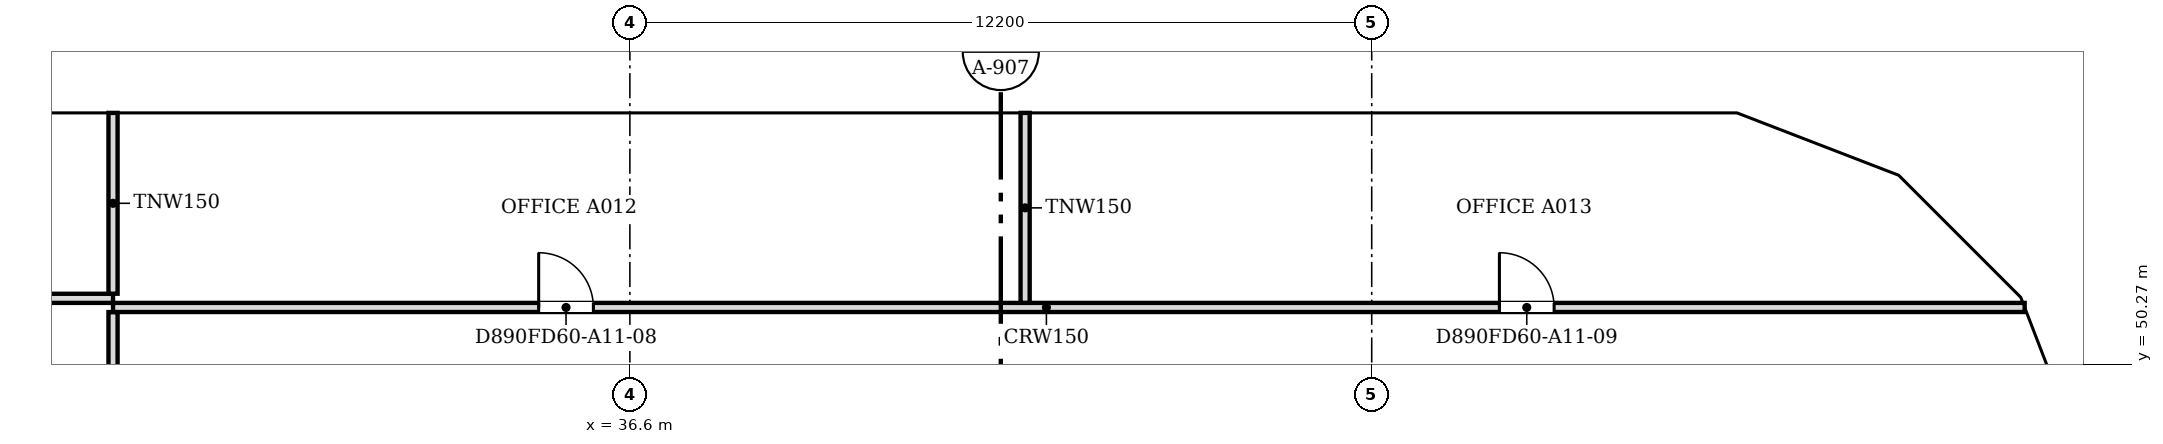
"""IFC4 building model, lengths in metres.
Left out: names, types, materials, properties, quantities, classifications, styles, units other than length and angle.
Written with IfcOpenShell. Run it as: python <this file> out.ifc"""

import sys

from ifc_helpers import new_model, si_unit, direction, frame, frame_2d, origin, place, context, subcontext, project, spatial, polyline, rectangle, outline, extrude, faceted_brep, source, transform, mapped, element, fill, save


model = new_model("IFC4")
c1 = context("Model", 3, precision=1e-05, world=origin(), true_north=direction((0.0, 1.0)))
c2 = subcontext(c1, "Body", "Model", "MODEL_VIEW")
j1 = project(units=[si_unit("LENGTHUNIT", "METRE"), si_unit("PLANEANGLEUNIT", "RADIAN")], contexts=[c1])
p1 = place(None, origin())
s1 = spatial("IfcSite", under=j1, at=p1, CompositionType="ELEMENT")
p2 = place(p1, origin())
s2 = spatial("IfcBuilding", under=s1, at=p2, CompositionType="ELEMENT")
p3 = place(p2, frame((0.0, 0.0, 131.6)))
s3 = spatial("IfcBuildingStorey", under=s2, at=p3, CompositionType="ELEMENT", Elevation=131.6)
m1 = source(origin(), c2, "Body", "Brep", [
    faceted_brep([(0.047, -0.25, 0.0), (2.997, -0.25, 3.8), (0.047, -0.25, 7.6), (0.0, -0.25, 7.541), (0.0, -0.25, 0.059), (0.093, 0.25, 7.54), (2.944, 0.25, 3.868), (2.944, 0.25, 3.732), (0.093, 0.25, 0.06), (2.997, 0.0, 3.8), (0.047, 0.0, 0.0), (0.047, 0.0, 7.6)], [[[0, 1, 2, 3, 4]], [[5, 6, 7, 8]], [[8, 7, 9, 1, 0, 10]], [[6, 5, 11, 2, 1, 9]], [[3, 2, 11]], [[10, 0, 4]], [[8, 10, 4, 3, 11, 5]], [[7, 6, 9]]]),
])
p4 = place(p3, frame((60.767, 48.71, -3.8), z_axis=(0.0, 0.0, 1.0), x_axis=(-0.359901446078, 0.932990326376, 0.0)))
e1 = element("IfcWall", 1, at=p4, inside=s3, PredefinedType="SOLIDWALL", context=c2, shape_type="MappedRepresentation", body=[
    mapped(m1, transform((0.0, 0.0, 0.0), scale=1.0)),
])
m2 = source(origin(), c2, "Body", "SweptSolid", [
    extrude(outline(polyline([(0.247, 0.665), (2.681, 3.8), (0.247, 6.935), (0.247, 0.665)])), frame((0.0, 0.26, 0.0), z_axis=(0.0, -1.0, 0.0), x_axis=(1.0, 0.0, 0.0)), (0.0, 0.0, 1.0), 0.52),
])
p5 = place(p4, origin())
e2 = element("IfcOpeningElement", 2, at=p5, cuts=e1, PredefinedType="OPENING", context=c2, shape_type="MappedRepresentation", body=[
    mapped(m2, transform((0.0, 0.0, 0.0), scale=1.0)),
])
m3 = source(origin(), c2, "Body", "Brep", [
    faceted_brep([(2.944, -0.25, 0.0), (2.997, -0.25, 0.068), (2.997, -0.25, 7.532), (2.944, -0.25, 7.6), (0.0, -0.25, 3.8), (0.053, 0.25, 3.868), (2.891, 0.25, 7.532), (2.891, 0.25, 0.068), (0.053, 0.25, 3.732), (2.944, 0.0, 0.0), (2.944, 0.0, 7.6), (0.0, 0.0, 3.8)], [[[0, 1, 2, 3, 4]], [[5, 6, 7, 8]], [[1, 0, 9]], [[10, 3, 2]], [[6, 5, 11, 4, 3, 10]], [[8, 7, 9, 0, 4, 11]], [[8, 11, 5]], [[1, 9, 7, 6, 10, 2]]]),
])
p6 = place(p3, frame((59.688, 51.506, -3.8), z_axis=(0.0, 0.0, 1.0), x_axis=(-0.707106781187, 0.707106781187, 0.0)))
e3 = element("IfcWall", 3, at=p6, inside=s3, PredefinedType="SOLIDWALL", context=c2, shape_type="MappedRepresentation", body=[
    mapped(m3, transform((0.0, 0.0, 0.0), scale=1.0)),
])
m4 = source(origin(), c2, "Body", "SweptSolid", [
    extrude(outline(polyline([(2.744, 6.934), (0.316, 3.8), (2.744, 0.666), (2.744, 6.934)])), frame((0.0, 0.26, 0.0), z_axis=(0.0, -1.0, 0.0), x_axis=(1.0, 0.0, 0.0)), (0.0, 0.0, 1.0), 0.52),
])
p7 = place(p6, origin())
e4 = element("IfcOpeningElement", 4, at=p7, cuts=e3, PredefinedType="OPENING", context=c2, shape_type="MappedRepresentation", body=[
    mapped(m4, transform((0.0, 0.0, 0.0), scale=1.0)),
])
m5 = source(origin(), c2, "Body", "Brep", [
    faceted_brep([(0.053, -0.25, 0.0), (3.003, -0.25, 3.8), (0.053, -0.25, 7.6), (0.0, -0.25, 7.531), (0.0, -0.25, 0.068), (0.106, 0.25, 7.532), (2.957, 0.25, 3.86), (2.957, 0.25, 3.74), (0.106, 0.25, 0.068), (3.003, 0.0, 3.8), (0.053, 0.0, 0.0), (0.053, 0.0, 7.6)], [[[0, 1, 2, 3, 4]], [[5, 6, 7, 8]], [[8, 7, 9, 1, 0, 10]], [[6, 5, 11, 2, 1, 9]], [[3, 2, 11]], [[10, 0, 4]], [[8, 10, 4, 3, 11, 5]], [[7, 6, 9]]]),
])
p8 = place(p3, frame((57.656, 53.569, -3.8), z_axis=(0.0, 0.0, 1.0), x_axis=(-0.933007896601, 0.359855894603, 0.0)))
e5 = element("IfcWall", 5, at=p8, inside=s3, PredefinedType="SOLIDWALL", context=c2, shape_type="MappedRepresentation", body=[
    mapped(m5, transform((0.0, 0.0, 0.0), scale=1.0)),
])
m6 = source(origin(), c2, "Body", "SweptSolid", [
    extrude(outline(polyline([(0.253, 0.665), (2.687, 3.8), (0.253, 6.935), (0.253, 0.665)])), frame((0.0, 0.26, 0.0), z_axis=(0.0, -1.0, 0.0), x_axis=(1.0, 0.0, 0.0)), (0.0, 0.0, 1.0), 0.52),
])
p9 = place(p8, origin())
e6 = element("IfcOpeningElement", 6, at=p9, cuts=e5, PredefinedType="OPENING", context=c2, shape_type="MappedRepresentation", body=[
    mapped(m6, transform((0.0, 0.0, 0.0), scale=1.0)),
])
m7 = source(origin(), c2, "Body", "Brep", [
    faceted_brep([(3.003, -0.25, 0.0), (6.053, -0.25, 3.8), (3.003, -0.25, 7.6), (0.0, -0.25, 3.8), (0.047, 0.25, 3.859), (3.003, 0.25, 7.6), (6.053, 0.25, 3.8), (3.003, 0.25, 0.0), (0.047, 0.25, 3.741), (0.0, 0.0, 3.8)], [[[0, 1, 2, 3]], [[4, 5, 6, 7, 8]], [[7, 6, 1, 0]], [[6, 5, 2, 1]], [[5, 4, 9, 3, 2]], [[8, 7, 0, 3, 9]], [[8, 9, 4]]]),
])
p10 = place(p3, frame((54.854, 54.65, -3.8), z_axis=(0.0, 0.0, 1.0), x_axis=(-1.0, 0.0, 0.0)))
e7 = element("IfcWall", 7, at=p10, inside=s3, PredefinedType="SOLIDWALL", context=c2, shape_type="MappedRepresentation", body=[
    mapped(m7, transform((0.0, 0.0, 0.0), scale=1.0)),
])
m8 = source(origin(), c2, "Body", "SweptSolid", [
    extrude(outline(polyline([(3.005, 0.401), (5.733, 3.8), (3.005, 7.199), (0.319, 3.8), (3.005, 0.401)])), frame((0.0, 0.26, 0.0), z_axis=(0.0, -1.0, 0.0), x_axis=(1.0, 0.0, 0.0)), (0.0, 0.0, 1.0), 0.52),
])
p11 = place(p10, origin())
e8 = element("IfcOpeningElement", 8, at=p11, cuts=e7, PredefinedType="OPENING", context=c2, shape_type="MappedRepresentation", body=[
    mapped(m8, transform((0.0, 0.0, 0.0), scale=1.0)),
])
m9 = source(origin(), c2, "Body", "SweptSolid", [
    extrude(outline(polyline([(3.05, 0.0), (6.1, 3.8), (3.05, 7.6), (0.0, 3.8), (3.05, 0.0)])), frame((0.0, 0.25, 0.0), z_axis=(0.0, -1.0, 0.0), x_axis=(1.0, 0.0, 0.0)), (0.0, 0.0, 1.0), 0.5),
])
p12 = place(p3, frame((48.8, 54.65, -3.8), z_axis=(0.0, 0.0, 1.0), x_axis=(-1.0, 0.0, 0.0)))
e9 = element("IfcWall", 9, at=p12, inside=s3, PredefinedType="SOLIDWALL", context=c2, shape_type="MappedRepresentation", body=[
    mapped(m9, transform((0.0, 0.0, 0.0), scale=1.0)),
])
m10 = source(origin(), c2, "Body", "SweptSolid", [
    extrude(outline(polyline([(3.05, 0.399), (5.78, 3.8), (3.05, 7.2), (0.321, 3.8), (3.05, 0.399)])), frame((0.0, 0.26, 0.0), z_axis=(0.0, -1.0, 0.0), x_axis=(1.0, 0.0, 0.0)), (0.0, 0.0, 1.0), 0.52),
])
p13 = place(p12, origin())
e10 = element("IfcOpeningElement", 10, at=p13, cuts=e9, PredefinedType="OPENING", context=c2, shape_type="MappedRepresentation", body=[
    mapped(m10, transform((0.0, 0.0, 0.0), scale=1.0)),
])
m11 = source(origin(), c2, "Body", "Brep", [
    faceted_brep([(3.05, -0.25, 0.0), (6.1, -0.25, 3.8), (6.1, -0.25, 3.8), (3.05, -0.25, 7.6), (0.0, -0.25, 3.8), (0.0, 0.25, 3.8), (3.05, 0.25, 7.6), (6.1, 0.25, 3.8), (6.1, 0.25, 3.8), (3.05, 0.25, 0.0)], [[[0, 1, 2, 3, 4]], [[5, 6, 7, 8, 9]], [[9, 8, 1, 0]], [[7, 6, 3, 2]], [[6, 5, 4, 3]], [[5, 9, 0, 4]], [[1, 8, 7, 2]]]),
])
p14 = place(p3, frame((42.7, 54.65, -3.8), z_axis=(0.0, 0.0, 1.0), x_axis=(-1.0, 0.0, 0.0)))
e11 = element("IfcWall", 11, at=p14, inside=s3, PredefinedType="SOLIDWALL", context=c2, shape_type="MappedRepresentation", body=[
    mapped(m11, transform((0.0, 0.0, 0.0), scale=1.0)),
])
p15 = place(p14, origin())
e12 = element("IfcOpeningElement", 12, at=p15, cuts=e11, PredefinedType="OPENING", context=c2, shape_type="MappedRepresentation", body=[
    mapped(m10, transform((0.0, 0.0, 0.0), scale=1.0)),
])
p16 = place(p3, frame((36.6, 54.65, -3.8), z_axis=(0.0, 0.0, 1.0), x_axis=(-1.0, 0.0, 0.0)))
e13 = element("IfcWall", 13, at=p16, inside=s3, PredefinedType="SOLIDWALL", context=c2, shape_type="MappedRepresentation", body=[
    mapped(m9, transform((0.0, 0.0, 0.0), scale=1.0)),
])
p17 = place(p16, origin())
e14 = element("IfcOpeningElement", 14, at=p17, cuts=e13, PredefinedType="OPENING", context=c2, shape_type="MappedRepresentation", body=[
    mapped(m10, transform((0.0, 0.0, 0.0), scale=1.0)),
])
p18 = place(p3, frame((30.5, 54.65, -3.8), z_axis=(0.0, 0.0, 1.0), x_axis=(-1.0, 0.0, 0.0)))
e15 = element("IfcWall", 15, at=p18, inside=s3, PredefinedType="SOLIDWALL", context=c2, shape_type="MappedRepresentation", body=[
    mapped(m9, transform((0.0, 0.0, 0.0), scale=1.0)),
])
p19 = place(p18, origin())
e16 = element("IfcOpeningElement", 16, at=p19, cuts=e15, PredefinedType="OPENING", context=c2, shape_type="MappedRepresentation", body=[
    mapped(m10, transform((0.0, 0.0, 0.0), scale=1.0)),
])
p20 = place(p2, frame((0.0, 0.0, 135.4)))
s4 = spatial("IfcBuildingStorey", under=s2, at=p20, CompositionType="ELEMENT", Elevation=135.4)
m12 = source(origin(), c2, "Body", "Brep", [
    faceted_brep([(2.95, -0.25, 0.0), (3.003, -0.25, 0.068), (3.003, -0.25, 7.531), (2.95, -0.25, 7.6), (0.0, -0.25, 3.8), (0.047, 0.25, 3.86), (2.898, 0.25, 7.532), (2.898, 0.25, 0.068), (0.047, 0.25, 3.74), (2.95, 0.0, 0.0), (2.95, 0.0, 7.6), (0.0, 0.0, 3.8)], [[[0, 1, 2, 3, 4]], [[5, 6, 7, 8]], [[1, 0, 9]], [[10, 3, 2]], [[6, 5, 11, 4, 3, 10]], [[8, 7, 9, 0, 4, 11]], [[8, 11, 5]], [[1, 9, 7, 6, 10, 2]]]),
])
p21 = place(p20, frame((60.75, 48.753, -3.8), z_axis=(0.0, 0.0, 1.0), x_axis=(-0.35992665181, 0.932980602862, 0.0)))
e17 = element("IfcWall", 17, at=p21, inside=s4, PredefinedType="SOLIDWALL", context=c2, shape_type="MappedRepresentation", body=[
    mapped(m12, transform((0.0, 0.0, 0.0), scale=1.0)),
])
m13 = source(origin(), c2, "Body", "SweptSolid", [
    extrude(outline(polyline([(2.75, 6.935), (0.316, 3.8), (2.75, 0.665), (2.75, 6.935)])), frame((0.0, 0.26, 0.0), z_axis=(0.0, -1.0, 0.0), x_axis=(1.0, 0.0, 0.0)), (0.0, 0.0, 1.0), 0.52),
])
p22 = place(p21, origin())
e18 = element("IfcOpeningElement", 18, at=p22, cuts=e17, PredefinedType="OPENING", context=c2, shape_type="MappedRepresentation", body=[
    mapped(m13, transform((0.0, 0.0, 0.0), scale=1.0)),
])
m14 = source(origin(), c2, "Body", "Brep", [
    faceted_brep([(0.053, -0.25, 0.0), (2.997, -0.25, 3.8), (0.053, -0.25, 7.6), (0.0, -0.25, 7.532), (0.0, -0.25, 0.068), (0.106, 0.25, 7.531), (2.944, 0.25, 3.868), (2.944, 0.25, 3.732), (0.106, 0.25, 0.068), (2.997, 0.0, 3.8), (0.053, 0.0, 0.0), (0.053, 0.0, 7.6)], [[[0, 1, 2, 3, 4]], [[5, 6, 7, 8]], [[8, 7, 9, 1, 0, 10]], [[6, 5, 11, 2, 1, 9]], [[3, 2, 11]], [[10, 0, 4]], [[8, 10, 4, 3, 11, 5]], [[9, 7, 6]]]),
])
p23 = place(p20, frame((59.726, 51.469, -3.8), z_axis=(0.0, 0.0, 1.0), x_axis=(-0.707106781187, 0.707106781187, 0.0)))
e19 = element("IfcWall", 19, at=p23, inside=s4, PredefinedType="SOLIDWALL", context=c2, shape_type="MappedRepresentation", body=[
    mapped(m14, transform((0.0, 0.0, 0.0), scale=1.0)),
])
m15 = source(origin(), c2, "Body", "SweptSolid", [
    extrude(outline(polyline([(0.253, 0.666), (2.681, 3.8), (0.253, 6.934), (0.253, 0.666)])), frame((0.0, 0.26, 0.0), z_axis=(0.0, -1.0, 0.0), x_axis=(1.0, 0.0, 0.0)), (0.0, 0.0, 1.0), 0.52),
])
p24 = place(p23, origin())
e20 = element("IfcOpeningElement", 20, at=p24, cuts=e19, PredefinedType="OPENING", context=c2, shape_type="MappedRepresentation", body=[
    mapped(m15, transform((0.0, 0.0, 0.0), scale=1.0)),
])
m16 = source(origin(), c2, "Body", "Brep", [
    faceted_brep([(2.95, -0.25, 0.0), (2.997, -0.25, 0.059), (2.997, -0.25, 7.541), (2.95, -0.25, 7.6), (0.0, -0.25, 3.8), (0.053, 0.25, 3.868), (2.904, 0.25, 7.54), (2.904, 0.25, 0.06), (0.053, 0.25, 3.732), (2.95, 0.0, 0.0), (2.95, 0.0, 7.6), (0.0, 0.0, 3.8)], [[[0, 1, 2, 3, 4]], [[5, 6, 7, 8]], [[1, 0, 9]], [[10, 3, 2]], [[6, 5, 11, 4, 3, 10]], [[8, 7, 9, 0, 4, 11]], [[8, 11, 5]], [[1, 9, 7, 6, 10, 2]]]),
])
p25 = place(p20, frame((57.606, 53.588, -3.8), z_axis=(0.0, 0.0, 1.0), x_axis=(-0.932990326376, 0.359901446078, 0.0)))
e21 = element("IfcWall", 21, at=p25, inside=s4, PredefinedType="SOLIDWALL", context=c2, shape_type="MappedRepresentation", body=[
    mapped(m16, transform((0.0, 0.0, 0.0), scale=1.0)),
])
p26 = place(p25, origin())
e22 = element("IfcOpeningElement", 22, at=p26, cuts=e21, PredefinedType="OPENING", context=c2, shape_type="MappedRepresentation", body=[
    mapped(m13, transform((0.0, 0.0, 0.0), scale=1.0)),
])
m17 = source(origin(), c2, "Body", "Brep", [
    faceted_brep([(0.047, -0.25, 0.0), (3.05, -0.25, 3.8), (0.047, -0.25, 7.6), (0.0, -0.25, 7.54), (0.0, -0.25, 0.06), (0.093, 0.25, 7.541), (3.05, 0.25, 3.8), (0.093, 0.25, 0.059), (0.047, 0.0, 0.0), (0.047, 0.0, 7.6)], [[[0, 1, 2, 3, 4]], [[5, 6, 7]], [[7, 6, 1, 0, 8]], [[6, 5, 9, 2, 1]], [[3, 2, 9]], [[8, 0, 4]], [[7, 8, 4, 3, 9, 5]]]),
])
p27 = place(p20, frame((54.9, 54.65, -3.8), z_axis=(0.0, 0.0, 1.0), x_axis=(-1.0, 0.0, 0.0)))
e23 = element("IfcWall", 23, at=p27, inside=s4, PredefinedType="SOLIDWALL", context=c2, shape_type="MappedRepresentation", body=[
    mapped(m17, transform((0.0, 0.0, 0.0), scale=1.0)),
])
m18 = source(origin(), c2, "Body", "SweptSolid", [
    extrude(outline(polyline([(0.247, 0.656), (2.731, 3.8), (0.247, 6.944), (0.247, 0.656)])), frame((0.0, 0.26, 0.0), z_axis=(0.0, -1.0, 0.0), x_axis=(1.0, 0.0, 0.0)), (0.0, 0.0, 1.0), 0.52),
])
p28 = place(p27, origin())
e24 = element("IfcOpeningElement", 24, at=p28, cuts=e23, PredefinedType="OPENING", context=c2, shape_type="MappedRepresentation", body=[
    mapped(m18, transform((0.0, 0.0, 0.0), scale=1.0)),
])
m19 = source(origin(), c2, "Body", "SweptSolid", [
    extrude(outline(polyline([(3.05, 0.0), (6.1, 3.8), (3.05, 7.6), (0.0, 3.8), (3.05, 0.0)])), frame((0.0, 0.25, 0.0), z_axis=(0.0, -1.0, 0.0), x_axis=(1.0, 0.0, 0.0)), (0.0, 0.0, 1.0), 0.5),
])
p29 = place(p20, frame((51.85, 54.65, -3.8), z_axis=(0.0, 0.0, 1.0), x_axis=(-1.0, 0.0, 0.0)))
e25 = element("IfcWall", 25, at=p29, inside=s4, PredefinedType="SOLIDWALL", context=c2, shape_type="MappedRepresentation", body=[
    mapped(m19, transform((0.0, 0.0, 0.0), scale=1.0)),
])
m20 = source(origin(), c2, "Body", "SweptSolid", [
    extrude(outline(polyline([(3.05, 0.399), (5.78, 3.8), (3.05, 7.2), (0.321, 3.8), (3.05, 0.399)])), frame((0.0, 0.26, 0.0), z_axis=(0.0, -1.0, 0.0), x_axis=(1.0, 0.0, 0.0)), (0.0, 0.0, 1.0), 0.52),
])
p30 = place(p29, origin())
e26 = element("IfcOpeningElement", 26, at=p30, cuts=e25, PredefinedType="OPENING", context=c2, shape_type="MappedRepresentation", body=[
    mapped(m20, transform((0.0, 0.0, 0.0), scale=1.0)),
])
p31 = place(p20, frame((45.75, 54.65, -3.8), z_axis=(0.0, 0.0, 1.0), x_axis=(-1.0, 0.0, 0.0)))
e27 = element("IfcWall", 27, at=p31, inside=s4, PredefinedType="SOLIDWALL", context=c2, shape_type="MappedRepresentation", body=[
    mapped(m19, transform((0.0, 0.0, 0.0), scale=1.0)),
])
p32 = place(p31, origin())
e28 = element("IfcOpeningElement", 28, at=p32, cuts=e27, PredefinedType="OPENING", context=c2, shape_type="MappedRepresentation", body=[
    mapped(m20, transform((0.0, 0.0, 0.0), scale=1.0)),
])
m21 = source(origin(), c2, "Body", "Brep", [
    faceted_brep([(3.05, -0.25, 0.0), (6.1, -0.25, 3.8), (6.1, -0.25, 3.8), (3.05, -0.25, 7.6), (0.0, -0.25, 3.8), (0.0, 0.25, 3.8), (3.05, 0.25, 7.6), (6.1, 0.25, 3.8), (6.1, 0.25, 3.8), (3.05, 0.25, 0.0)], [[[0, 1, 2, 3, 4]], [[5, 6, 7, 8, 9]], [[9, 8, 1, 0]], [[7, 6, 3, 2]], [[6, 5, 4, 3]], [[5, 9, 0, 4]], [[1, 8, 7, 2]]]),
])
p33 = place(p20, frame((39.65, 54.65, -3.8), z_axis=(0.0, 0.0, 1.0), x_axis=(-1.0, 0.0, 0.0)))
e29 = element("IfcWall", 29, at=p33, inside=s4, PredefinedType="SOLIDWALL", context=c2, shape_type="MappedRepresentation", body=[
    mapped(m21, transform((0.0, 0.0, 0.0), scale=1.0)),
])
p34 = place(p33, origin())
e30 = element("IfcOpeningElement", 30, at=p34, cuts=e29, PredefinedType="OPENING", context=c2, shape_type="MappedRepresentation", body=[
    mapped(m20, transform((0.0, 0.0, 0.0), scale=1.0)),
])
p35 = place(p20, frame((33.55, 54.65, -3.8), z_axis=(0.0, 0.0, 1.0), x_axis=(-1.0, 0.0, 0.0)))
e31 = element("IfcWall", 31, at=p35, inside=s4, PredefinedType="SOLIDWALL", context=c2, shape_type="MappedRepresentation", body=[
    mapped(m19, transform((0.0, 0.0, 0.0), scale=1.0)),
])
p36 = place(p35, origin())
e32 = element("IfcOpeningElement", 32, at=p36, cuts=e31, PredefinedType="OPENING", context=c2, shape_type="MappedRepresentation", body=[
    mapped(m20, transform((0.0, 0.0, 0.0), scale=1.0)),
])
p37 = place(p20, frame((27.45, 54.65, -3.8), z_axis=(0.0, 0.0, 1.0), x_axis=(-1.0, 0.0, 0.0)))
e33 = element("IfcWall", 33, at=p37, inside=s4, PredefinedType="SOLIDWALL", context=c2, shape_type="MappedRepresentation", body=[
    mapped(m21, transform((0.0, 0.0, 0.0), scale=1.0)),
])
p38 = place(p37, origin())
e34 = element("IfcOpeningElement", 34, at=p38, cuts=e33, PredefinedType="OPENING", context=c2, shape_type="MappedRepresentation", body=[
    mapped(m20, transform((0.0, 0.0, 0.0), scale=1.0)),
])
p39 = place(p3, frame((28.1, 47.776, 0.0), z_axis=(0.0, 0.0, 1.0), x_axis=(0.0, 1.0, 0.0)))
e35 = element("IfcWall", 35, at=p39, inside=s3, PredefinedType="PARTITIONING", context=c2, shape_type="SweptSolid", body=[
    extrude(rectangle(XDim=3.348, YDim=0.15, at=frame_2d((1.674, 0.0))), origin(), (0.0, 0.0, 1.0), 3.067),
])
p40 = place(p3, frame((28.1, 51.2, 0.0), z_axis=(0.0, 0.0, 1.0), x_axis=(1.0, 0.0, 0.0)))
e36 = element("IfcWall", 36, at=p40, inside=s3, PredefinedType="PARTITIONING", context=c2, shape_type="SweptSolid", body=[
    extrude(rectangle(XDim=31.438, YDim=0.15, at=frame_2d((15.719, 0.0))), origin(), (0.0, 0.0, 1.0), 3.067),
])
m22 = source(origin(), c2, "Body", "SweptSolid", [
    extrude(rectangle(XDim=0.9, YDim=2.1, at=frame_2d((0.45, 1.05))), frame((0.0, 0.085, 0.0), z_axis=(0.0, -1.0, 0.0), x_axis=(1.0, 0.0, 0.0)), (0.0, 0.0, 1.0), 0.17),
])
p41 = place(p40, frame((7.0, 0.0, 0.0)))
e37 = element("IfcOpeningElement", 37, at=p41, cuts=e36, PredefinedType="OPENING", context=c2, shape_type="MappedRepresentation", body=[
    mapped(m22, transform((0.0, 0.0, 0.0), scale=1.0)),
])
p42 = place(p40, frame((22.8, 0.0, 0.0)))
e38 = element("IfcOpeningElement", 38, at=p42, cuts=e36, PredefinedType="OPENING", context=c2, shape_type="MappedRepresentation", body=[
    mapped(m22, transform((0.0, 0.0, 0.0), scale=1.0)),
])
p43 = place(p3, frame((43.1, 51.276, 0.0), z_axis=(0.0, 0.0, 1.0), x_axis=(0.0, 1.0, 0.0)))
e39 = element("IfcWall", 39, at=p43, inside=s3, PredefinedType="PARTITIONING", context=c2, shape_type="SweptSolid", body=[
    extrude(rectangle(XDim=3.124, YDim=0.15, at=frame_2d((1.562, 0.0))), origin(), (0.0, 0.0, 1.0), 3.067),
])
p44 = place(p3, frame((19.7, 51.35, 0.0), z_axis=(0.0, 0.0, 1.0), x_axis=(1.0, 0.0, 0.0)))
e40 = element("IfcWall", 40, at=p44, inside=s3, PredefinedType="PARTITIONING", context=c2, shape_type="SweptSolid", body=[
    extrude(rectangle(XDim=8.4, YDim=0.15, at=frame_2d((4.2, 0.0))), origin(), (0.0, 0.0, 1.0), 3.067),
])
p45 = place(p44, frame((3.7, 0.0, 0.0)))
e41 = element("IfcOpeningElement", 41, at=p45, cuts=e40, PredefinedType="OPENING", context=c2, shape_type="MappedRepresentation", body=[
    mapped(m22, transform((0.0, 0.0, 0.0), scale=1.0)),
])
p46 = place(p3, frame((28.1, 51.426, 0.0), z_axis=(0.0, 0.0, 1.0), x_axis=(0.0, 1.0, 0.0)))
e42 = element("IfcWall", 42, at=p46, inside=s3, PredefinedType="PARTITIONING", context=c2, shape_type="SweptSolid", body=[
    extrude(rectangle(XDim=2.974, YDim=0.15, at=frame_2d((1.487, 0.0))), origin(), (0.0, 0.0, 1.0), 3.067),
])
m23 = source(origin(), c2, "Body", "SweptSolid", [
    extrude(rectangle(XDim=0.9, YDim=2.1, at=frame_2d((0.45, 1.05))), frame((0.0, 0.025, 0.0), z_axis=(0.0, -1.0, 0.0), x_axis=(1.0, 0.0, 0.0)), (0.0, 0.0, 1.0), 0.05),
])
p47 = place(p41, origin())
e43 = element("IfcDoor", 43, at=p47, inside=s3, OperationType="SINGLE_SWING_LEFT", PredefinedType="DOOR", context=c2, shape_type="MappedRepresentation", body=[
    mapped(m23, transform((0.0, 0.0, 0.0), scale=1.0)),
])
fill(e37, e43)
p48 = place(p42, origin())
e44 = element("IfcDoor", 44, at=p48, inside=s3, OperationType="SINGLE_SWING_LEFT", PredefinedType="DOOR", context=c2, shape_type="MappedRepresentation", body=[
    mapped(m23, transform((0.0, 0.0, 0.0), scale=1.0)),
])
fill(e38, e44)
save(model, sys.argv[1])
